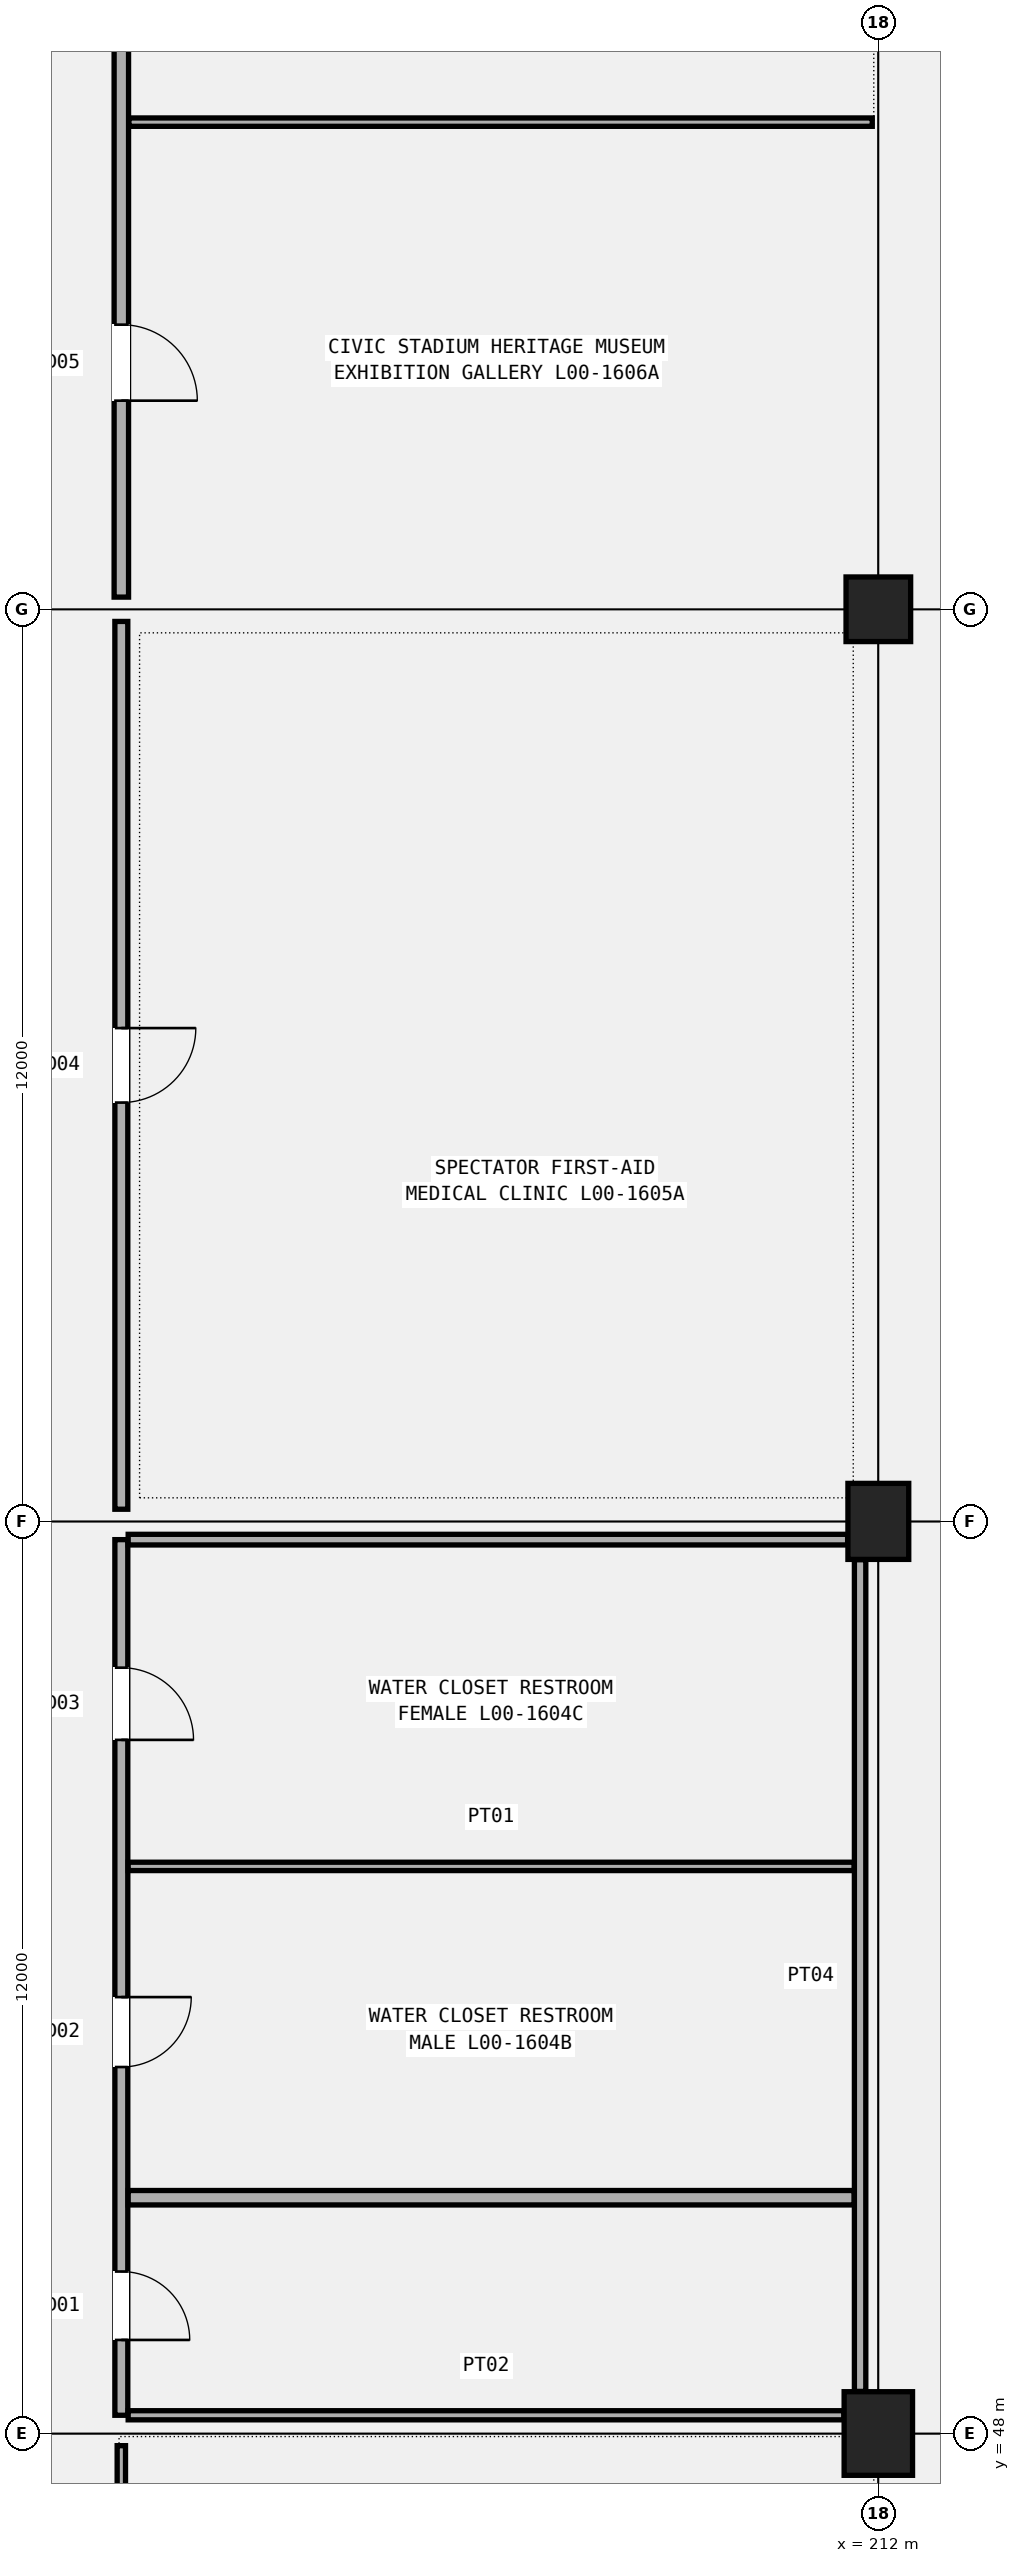
"""IFC4 building model, lengths in metres.
Left out: names, types, materials, properties, quantities, classifications, styles, units other than length and angle.
Written with IfcOpenShell. Run it as: python <this file> out.ifc"""

import sys

from ifc_helpers import new_model, si_unit, direction, frame, frame_2d, origin, origin_2d, place, context, subcontext, project, spatial, rectangle, circle, extrude, element, fill, save


model = new_model("IFC4")
c1 = context("Model", 3, precision=1e-05, world=origin(), true_north=direction((0.0, 1.0)))
c2 = subcontext(c1, "Body", "Model", "MODEL_VIEW")
j1 = project(units=[si_unit("LENGTHUNIT", "METRE"), si_unit("PLANEANGLEUNIT", "RADIAN")], contexts=[c1])
p1 = place(None, origin())
s1 = spatial("IfcSite", under=j1, at=p1, CompositionType="ELEMENT")
p2 = place(p1, origin())
s2 = spatial("IfcBuilding", under=s1, at=p2, CompositionType="ELEMENT")
p3 = place(p2, origin())
s3 = spatial("IfcBuildingStorey", under=s2, at=p3, CompositionType="ELEMENT", Elevation=0.0)
p4 = place(p3, frame((212.0, 48.0, 0.0), z_axis=(0.0, 0.0, 1.0), x_axis=(1.0, 0.0, 0.0)))
e1 = element("IfcColumn", 1, at=p4, inside=s3, PredefinedType="COLUMN", context=c2, shape_type="SweptSolid", body=[
    extrude(rectangle(XDim=0.9, YDim=1.1, at=origin_2d()), origin(), (0.0, 0.0, 1.0), 5.4),
])
p5 = place(p3, frame((212.0, 60.0, 0.0), z_axis=(0.0, 0.0, 1.0), x_axis=(1.0, 0.0, 0.0)))
e2 = element("IfcColumn", 2, at=p5, inside=s3, PredefinedType="COLUMN", context=c2, shape_type="SweptSolid", body=[
    extrude(rectangle(XDim=0.8, YDim=1.0, at=origin_2d()), origin(), (0.0, 0.0, 1.0), 5.4),
])
p6 = place(p3, frame((212.0, 72.0, 0.0), z_axis=(0.0, 0.0, 1.0), x_axis=(1.0, 0.0, 0.0)))
e3 = element("IfcColumn", 3, at=p6, inside=s3, PredefinedType="COLUMN", context=c2, shape_type="SweptSolid", body=[
    extrude(circle(Radius=0.425, at=origin_2d()), origin(), (0.0, 0.0, 1.0), 5.4),
])
p7 = place(p3, frame((202.04, 37.97, 0.0), z_axis=(0.0, 0.0, 1.0), x_axis=(0.0, 1.0, 0.0)))
e4 = element("IfcWall", 4, at=p7, inside=s3, PredefinedType="PARTITIONING", context=c2, shape_type="SweptSolid", body=[
    extrude(rectangle(XDim=9.87, YDim=0.11, at=frame_2d((4.935, 0.0))), origin(), (0.0, 0.0, 1.0), 4.52),
])
p8 = place(p7, frame((5.815, 0.0, 0.0), z_axis=(0.0, 0.0, 1.0), x_axis=(-1.0, 0.0, 0.0)))
e5 = element("IfcOpeningElement", 5, at=p8, cuts=e4, PredefinedType="OPENING", context=c2, shape_type="SweptSolid", body=[
    extrude(rectangle(XDim=1.76, YDim=2.3, at=frame_2d((0.88, 1.15))), frame((0.0, 0.065, 0.0), z_axis=(0.0, -1.0, 0.0), x_axis=(1.0, 0.0, 0.0)), (0.0, 0.0, 1.0), 0.13),
])
p9 = place(p3, frame((202.04, 48.24, 0.0), z_axis=(0.0, 0.0, 1.0), x_axis=(0.0, 1.0, 0.0)))
e6 = element("IfcWall", 6, at=p9, inside=s3, PredefinedType="PARTITIONING", context=c2, shape_type="SweptSolid", body=[
    extrude(rectangle(XDim=11.52, YDim=0.17, at=frame_2d((5.76, 0.0))), origin(), (0.0, 0.0, 1.0), 4.52),
])
p10 = place(p9, frame((1.891, 0.0, 0.0), z_axis=(0.0, 0.0, 1.0), x_axis=(-1.0, 0.0, 0.0)))
e7 = element("IfcOpeningElement", 7, at=p10, cuts=e6, PredefinedType="OPENING", context=c2, shape_type="SweptSolid", body=[
    extrude(rectangle(XDim=0.9, YDim=2.06, at=frame_2d((0.45, 1.03))), frame((0.0, 0.095, 0.0), z_axis=(0.0, -1.0, 0.0), x_axis=(1.0, 0.0, 0.0)), (0.0, 0.0, 1.0), 0.19),
])
p11 = place(p9, frame((5.501, 0.0, 0.0), z_axis=(0.0, 0.0, 1.0), x_axis=(-1.0, 0.0, 0.0)))
e8 = element("IfcOpeningElement", 8, at=p11, cuts=e6, PredefinedType="OPENING", context=c2, shape_type="SweptSolid", body=[
    extrude(rectangle(XDim=0.92, YDim=2.1, at=frame_2d((0.46, 1.05))), frame((0.0, 0.095, 0.0), z_axis=(0.0, -1.0, 0.0), x_axis=(1.0, 0.0, 0.0)), (0.0, 0.0, 1.0), 0.19),
])
p12 = place(p9, frame((9.835, 0.0, 0.0), z_axis=(0.0, 0.0, 1.0), x_axis=(-1.0, 0.0, 0.0)))
e9 = element("IfcOpeningElement", 9, at=p12, cuts=e6, PredefinedType="OPENING", context=c2, shape_type="SweptSolid", body=[
    extrude(rectangle(XDim=0.95, YDim=2.12, at=frame_2d((0.475, 1.06))), frame((0.0, 0.095, 0.0), z_axis=(0.0, -1.0, 0.0), x_axis=(1.0, 0.0, 0.0)), (0.0, 0.0, 1.0), 0.19),
])
p13 = place(p3, frame((202.13, 48.24, 0.0), z_axis=(0.0, 0.0, 1.0), x_axis=(1.0, 0.0, 0.0)))
e10 = element("IfcWall", 10, at=p13, inside=s3, PredefinedType="PARTITIONING", context=c2, shape_type="SweptSolid", body=[
    extrude(rectangle(XDim=9.416, YDim=0.12, at=frame_2d((4.708, 0.0))), origin(), (0.0, 0.0, 1.0), 4.05),
])
p14 = place(p3, frame((202.13, 59.76, 0.0), z_axis=(0.0, 0.0, 1.0), x_axis=(1.0, 0.0, 0.0)))
e11 = element("IfcWall", 11, at=p14, inside=s3, PredefinedType="PARTITIONING", context=c2, shape_type="SweptSolid", body=[
    extrude(rectangle(XDim=9.466, YDim=0.14, at=frame_2d((4.733, 0.0))), origin(), (0.0, 0.0, 1.0), 4.2),
])
p15 = place(p3, frame((211.76, 48.554, 0.0), z_axis=(0.0, 0.0, 1.0), x_axis=(0.0, 1.0, 0.0)))
e12 = element("IfcWall", 12, at=p15, inside=s3, PredefinedType="PARTITIONING", context=c2, shape_type="SweptSolid", body=[
    extrude(rectangle(XDim=10.942, YDim=0.15, at=frame_2d((5.471, 0.0))), origin(), (0.0, 0.0, 1.0), 4.2),
])
p16 = place(p3, frame((202.13, 51.102, 0.0), z_axis=(0.0, 0.0, 1.0), x_axis=(1.0, 0.0, 0.0)))
e13 = element("IfcWall", 13, at=p16, inside=s3, PredefinedType="PARTITIONING", context=c2, shape_type="SweptSolid", body=[
    extrude(rectangle(XDim=9.55, YDim=0.19, at=frame_2d((4.775, 0.0))), origin(), (0.0, 0.0, 1.0), 4.52),
])
p17 = place(p3, frame((202.13, 55.461, 0.0), z_axis=(0.0, 0.0, 1.0), x_axis=(1.0, 0.0, 0.0)))
e14 = element("IfcWall", 14, at=p17, inside=s3, PredefinedType="PARTITIONING", context=c2, shape_type="SweptSolid", body=[
    extrude(rectangle(XDim=9.55, YDim=0.11, at=frame_2d((4.775, 0.0))), origin(), (0.0, 0.0, 1.0), 4.52),
])
p18 = place(p3, frame((202.04, 60.16, 0.0), z_axis=(0.0, 0.0, 1.0), x_axis=(0.0, 1.0, 0.0)))
e15 = element("IfcWall", 15, at=p18, inside=s3, PredefinedType="PARTITIONING", context=c2, shape_type="SweptSolid", body=[
    extrude(rectangle(XDim=11.68, YDim=0.17, at=frame_2d((5.84, 0.0))), origin(), (0.0, 0.0, 1.0), 4.52),
])
p19 = place(p18, frame((6.33, 0.0, 0.0), z_axis=(0.0, 0.0, 1.0), x_axis=(-1.0, 0.0, 0.0)))
e16 = element("IfcOpeningElement", 16, at=p19, cuts=e15, PredefinedType="OPENING", context=c2, shape_type="SweptSolid", body=[
    extrude(rectangle(XDim=0.98, YDim=2.1, at=frame_2d((0.49, 1.05))), frame((0.0, 0.095, 0.0), z_axis=(0.0, -1.0, 0.0), x_axis=(1.0, 0.0, 0.0)), (0.0, 0.0, 1.0), 0.19),
])
p20 = place(p3, frame((202.04, 72.16, 0.0), z_axis=(0.0, 0.0, 1.0), x_axis=(0.0, 1.0, 0.0)))
e17 = element("IfcWall", 17, at=p20, inside=s3, PredefinedType="PARTITIONING", context=c2, shape_type="SweptSolid", body=[
    extrude(rectangle(XDim=11.68, YDim=0.19, at=frame_2d((5.84, 0.0))), origin(), (0.0, 0.0, 1.0), 4.52),
])
p21 = place(p20, frame((3.584, 0.0, 0.0), z_axis=(0.0, 0.0, 1.0), x_axis=(-1.0, 0.0, 0.0)))
e18 = element("IfcOpeningElement", 18, at=p21, cuts=e17, PredefinedType="OPENING", context=c2, shape_type="SweptSolid", body=[
    extrude(rectangle(XDim=1.0, YDim=2.14, at=frame_2d((0.5, 1.07))), frame((0.0, 0.105, 0.0), z_axis=(0.0, -1.0, 0.0), x_axis=(1.0, 0.0, 0.0)), (0.0, 0.0, 1.0), 0.21),
])
p22 = place(p20, frame((9.52, 0.0, 0.0), z_axis=(0.0, 0.0, 1.0), x_axis=(-1.0, 0.0, 0.0)))
e19 = element("IfcOpeningElement", 19, at=p22, cuts=e17, PredefinedType="OPENING", context=c2, shape_type="SweptSolid", body=[
    extrude(rectangle(XDim=1.03, YDim=2.12, at=frame_2d((0.515, 1.06))), frame((0.0, 0.105, 0.0), z_axis=(0.0, -1.0, 0.0), x_axis=(1.0, 0.0, 0.0)), (0.0, 0.0, 1.0), 0.21),
])
p23 = place(p3, frame((202.14, 78.409, 0.0), z_axis=(0.0, 0.0, 1.0), x_axis=(1.0, 0.0, 0.0)))
e20 = element("IfcWall", 20, at=p23, inside=s3, PredefinedType="PARTITIONING", context=c2, shape_type="SweptSolid", body=[
    extrude(rectangle(XDim=9.78, YDim=0.11, at=frame_2d((4.89, 0.0))), origin(), (0.0, 0.0, 1.0), 4.52),
])
p24 = place(p10, origin())
e21 = element("IfcDoor", 21, at=p24, inside=s3, OperationType="SINGLE_SWING_RIGHT", PredefinedType="DOOR", context=c2, shape_type="SweptSolid", body=[
    extrude(rectangle(XDim=0.9, YDim=2.06, at=frame_2d((0.45, 1.03))), frame((0.0, 0.025, 0.0), z_axis=(0.0, -1.0, 0.0), x_axis=(1.0, 0.0, 0.0)), (0.0, 0.0, 1.0), 0.05),
])
fill(e7, e21)
p25 = place(p11, origin())
e22 = element("IfcDoor", 22, at=p25, inside=s3, OperationType="SINGLE_SWING_LEFT", PredefinedType="DOOR", context=c2, shape_type="SweptSolid", body=[
    extrude(rectangle(XDim=0.92, YDim=2.1, at=frame_2d((0.46, 1.05))), frame((0.0, 0.025, 0.0), z_axis=(0.0, -1.0, 0.0), x_axis=(1.0, 0.0, 0.0)), (0.0, 0.0, 1.0), 0.05),
])
fill(e8, e22)
p26 = place(p12, origin())
e23 = element("IfcDoor", 23, at=p26, inside=s3, OperationType="SINGLE_SWING_RIGHT", PredefinedType="DOOR", context=c2, shape_type="SweptSolid", body=[
    extrude(rectangle(XDim=0.95, YDim=2.12, at=frame_2d((0.475, 1.06))), frame((0.0, 0.025, 0.0), z_axis=(0.0, -1.0, 0.0), x_axis=(1.0, 0.0, 0.0)), (0.0, 0.0, 1.0), 0.05),
])
fill(e9, e23)
p27 = place(p19, origin())
e24 = element("IfcDoor", 24, at=p27, inside=s3, OperationType="SINGLE_SWING_LEFT", PredefinedType="DOOR", context=c2, shape_type="SweptSolid", body=[
    extrude(rectangle(XDim=0.98, YDim=2.1, at=frame_2d((0.49, 1.05))), frame((0.0, 0.025, 0.0), z_axis=(0.0, -1.0, 0.0), x_axis=(1.0, 0.0, 0.0)), (0.0, 0.0, 1.0), 0.05),
])
fill(e16, e24)
p28 = place(p21, origin())
e25 = element("IfcDoor", 25, at=p28, inside=s3, OperationType="SINGLE_SWING_RIGHT", PredefinedType="DOOR", context=c2, shape_type="SweptSolid", body=[
    extrude(rectangle(XDim=1.0, YDim=2.14, at=frame_2d((0.5, 1.07))), frame((0.0, 0.025, 0.0), z_axis=(0.0, -1.0, 0.0), x_axis=(1.0, 0.0, 0.0)), (0.0, 0.0, 1.0), 0.05),
])
fill(e18, e25)
save(model, sys.argv[1])
